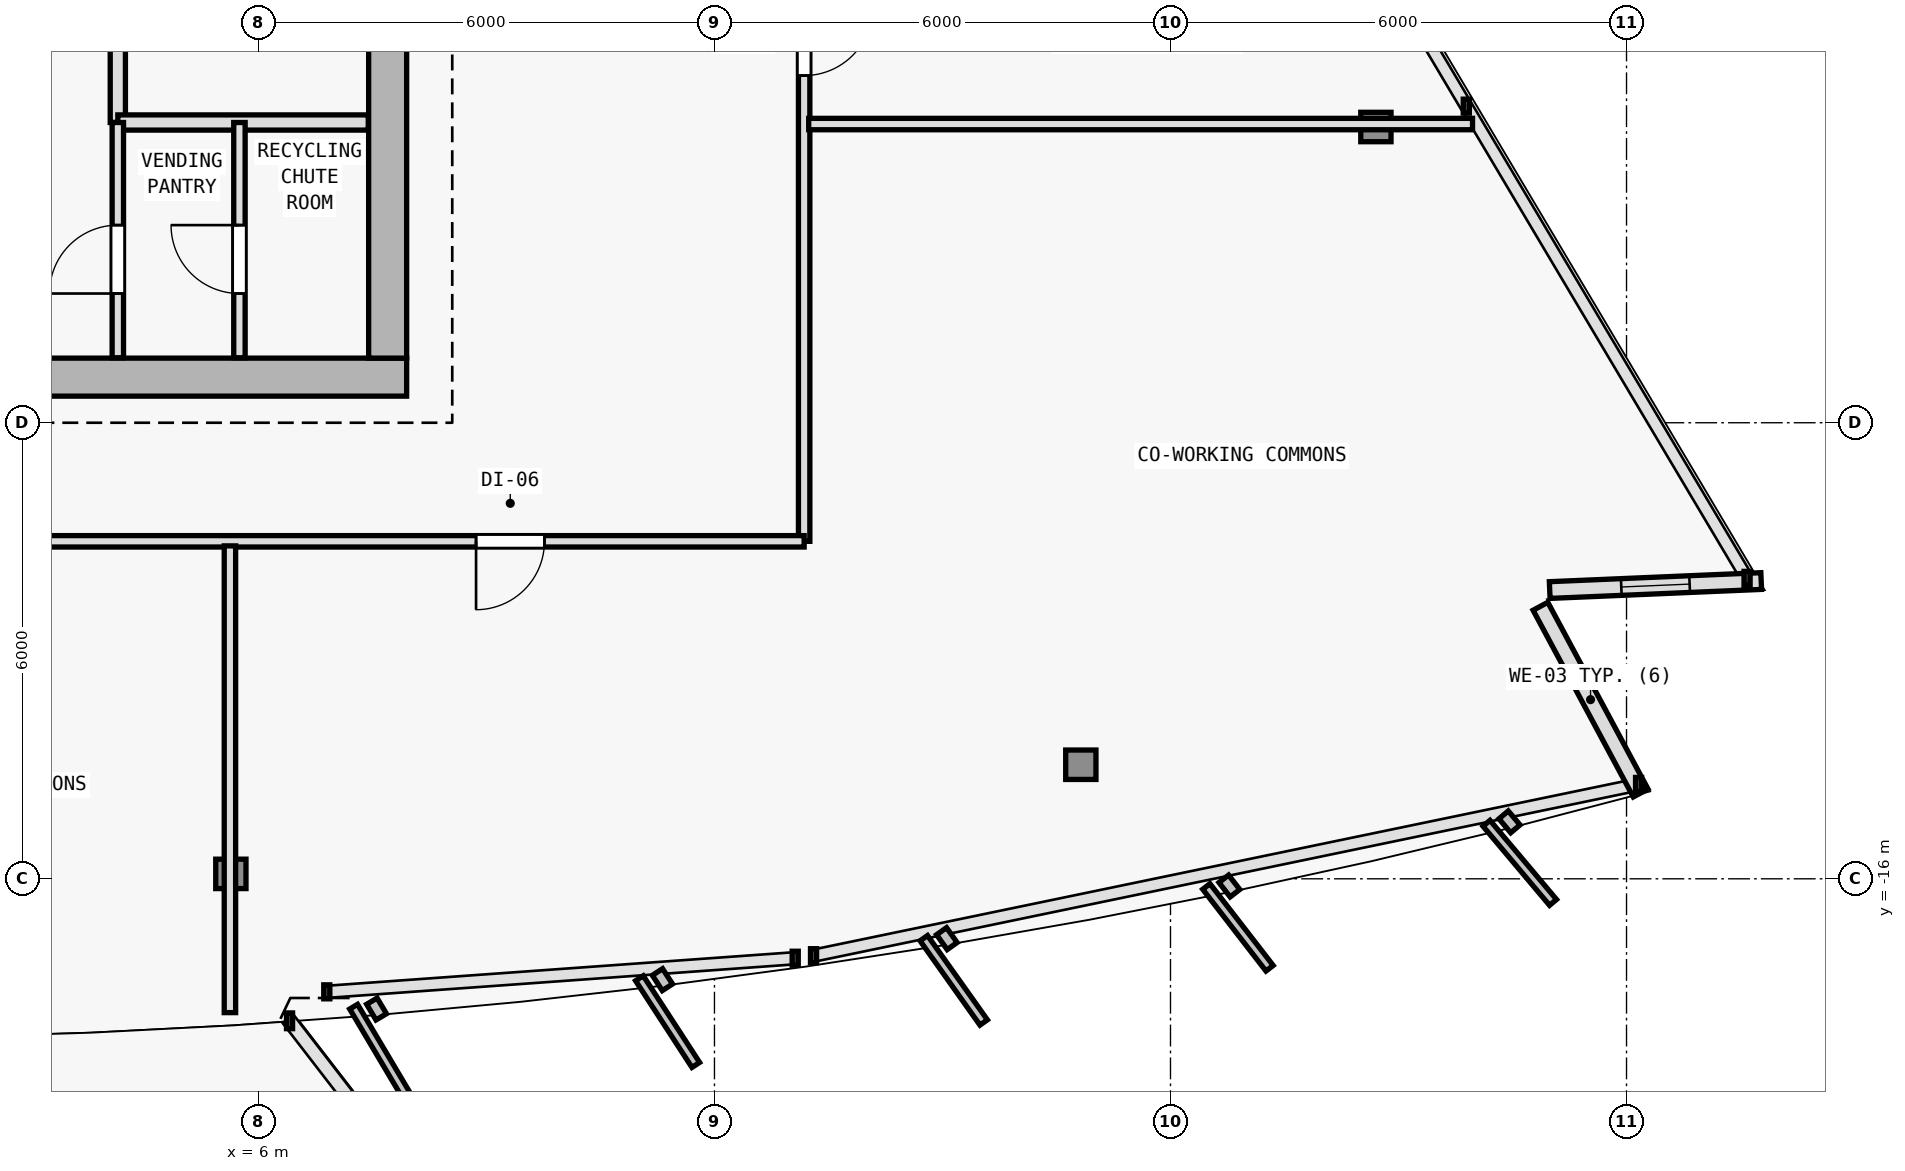
"""IFC4 building model, lengths in metres.
Left out: names, types, materials, properties, quantities, classifications, styles, units other than length and angle.
Written with IfcOpenShell. Run it as: python <this file> out.ifc"""

import sys

from ifc_helpers import new_model, si_unit, direction, frame, frame_2d, origin, origin_2d, place, context, subcontext, project, spatial, rectangle, i_section, extrude, element, fill, save


model = new_model("IFC4")
c1 = context("Model", 3, precision=1e-05, world=origin(), true_north=direction((0.0, 1.0)))
c2 = subcontext(c1, "Body", "Model", "MODEL_VIEW")
j1 = project(units=[si_unit("LENGTHUNIT", "METRE"), si_unit("PLANEANGLEUNIT", "RADIAN")], contexts=[c1])
p1 = place(None, origin())
s1 = spatial("IfcSite", under=j1, at=p1, CompositionType="ELEMENT")
p2 = place(p1, origin())
s2 = spatial("IfcBuilding", under=s1, at=p2, CompositionType="ELEMENT")
p3 = place(p2, frame((0.0, 0.0, 205.5)))
s3 = spatial("IfcBuildingStorey", under=s2, at=p3, CompositionType="ELEMENT", Elevation=205.5)
p4 = place(p3, frame((7.7, -9.4, 0.0), z_axis=(0.0, 0.0, 1.0), x_axis=(1.0, 0.0, 0.0)))
e1 = element("IfcColumn", 1, at=p4, inside=s3, PredefinedType="COLUMN", context=c2, shape_type="SweptSolid", body=[
    extrude(i_section(OverallWidth=0.398, OverallDepth=0.387, WebThickness=0.013, FlangeThickness=0.022, FilletRadius=0.015, at=origin_2d()), origin(), (0.0, 0.0, 1.0), 3.6),
])
p5 = place(p3, frame((5.637, -15.935, 0.006), z_axis=(-0.006866308162, 0.0352833063, 0.999353762243), x_axis=(-0.981585848295, -0.191021523464, 0.0)))
e2 = element("IfcColumn", 2, at=p5, inside=s3, PredefinedType="COLUMN", context=c2, shape_type="SweptSolid", body=[
    extrude(i_section(OverallWidth=0.398, OverallDepth=0.387, WebThickness=0.013, FlangeThickness=0.022, FilletRadius=0.015, at=origin_2d()), origin(), (0.0, 0.0, 1.0), 3.591),
])
p6 = place(p3, frame((16.82, -14.5, 0.006), z_axis=(-0.020664238418, 0.033511412961, 0.999224686671), x_axis=(-0.851183725565, -0.524867855115, 0.0)))
e3 = element("IfcColumn", 3, at=p6, inside=s3, PredefinedType="COLUMN", context=c2, shape_type="SweptSolid", body=[
    extrude(i_section(OverallWidth=0.398, OverallDepth=0.387, WebThickness=0.013, FlangeThickness=0.022, FilletRadius=0.015, at=origin_2d()), origin(), (0.0, 0.0, 1.0), 3.592),
])
p7 = place(p3, frame((20.702, -6.109, 0.006), z_axis=(-0.026039494941, 0.021620259507, 0.999427090428), x_axis=(-0.638800249892, -0.769372628015, 0.0)))
e4 = element("IfcColumn", 4, at=p7, inside=s3, PredefinedType="COLUMN", context=c2, shape_type="SweptSolid", body=[
    extrude(i_section(OverallWidth=0.398, OverallDepth=0.387, WebThickness=0.013, FlangeThickness=0.022, FilletRadius=0.015, at=origin_2d()), origin(), (0.0, 0.0, 1.0), 3.591),
])
p8 = place(p3, frame((22.868, -12.415, 0.0), z_axis=(0.0, 0.0, 1.0), x_axis=(0.472845900162, -0.881145138272, 0.0)))
e5 = element("IfcWall", 5, at=p8, inside=s3, PredefinedType="SOLIDWALL", context=c2, shape_type="SweptSolid", body=[
    extrude(rectangle(XDim=2.788, YDim=0.22, at=frame_2d((1.394, 0.0))), origin(), (0.0, 0.0, 1.0), 3.35),
])
p9 = place(p3, frame((25.772, -12.083, 0.0), z_axis=(0.0, 0.0, 1.0), x_axis=(-0.999095761456, -0.042516578425, 0.0)))
e6 = element("IfcWall", 6, at=p9, inside=s3, PredefinedType="SOLIDWALL", context=c2, shape_type="SweptSolid", body=[
    extrude(rectangle(XDim=2.785, YDim=0.22, at=frame_2d((1.393, 0.0))), origin(), (0.0, 0.0, 1.0), 3.35),
])
p10 = place(p9, frame((0.942, 0.0, 0.62)))
e7 = element("IfcOpeningElement", 7, at=p10, cuts=e6, PredefinedType="OPENING", context=c2, shape_type="SweptSolid", body=[
    extrude(rectangle(XDim=0.9, YDim=1.6, at=frame_2d((0.45, 0.8))), frame((0.0, 0.12, 0.0), z_axis=(0.0, -1.0, 0.0), x_axis=(1.0, 0.0, 0.0)), (0.0, 0.0, 1.0), 0.24),
])
p11 = place(p3, frame((-7.95, -9.4, 0.0), z_axis=(0.0, 0.0, 1.0), x_axis=(1.0, 0.0, 0.0)))
e8 = element("IfcWall", 8, at=p11, inside=s3, PredefinedType="SHEAR", context=c2, shape_type="SweptSolid", body=[
    extrude(rectangle(XDim=15.9, YDim=0.5, at=frame_2d((7.95, 0.0))), origin(), (0.0, 0.0, 1.0), 3.35),
])
p12 = place(p11, frame((9.6, 0.0, 0.0)))
e9 = element("IfcOpeningElement", 9, at=p12, cuts=e8, PredefinedType="OPENING", context=c2, shape_type="SweptSolid", body=[
    extrude(rectangle(XDim=1.5, YDim=2.2, at=frame_2d((0.75, 1.1))), frame((0.0, 0.26, 0.0), z_axis=(0.0, -1.0, 0.0), x_axis=(1.0, 0.0, 0.0)), (0.0, 0.0, 1.0), 0.52),
])
p13 = place(p3, frame((7.7, 9.95, 0.0), z_axis=(0.0, 0.0, 1.0), x_axis=(0.0, -1.0, 0.0)))
e10 = element("IfcWall", 10, at=p13, inside=s3, PredefinedType="SHEAR", context=c2, shape_type="SweptSolid", body=[
    extrude(rectangle(XDim=19.1, YDim=0.5, at=frame_2d((9.55, 0.0))), origin(), (0.0, 0.0, 1.0), 3.35),
])
p14 = place(p3, frame((4.15, -6.05, 0.0), z_axis=(0.0, 0.0, 1.0), x_axis=(0.0, 1.0, 0.0)))
e11 = element("IfcWall", 11, at=p14, inside=s3, PredefinedType="SOLIDWALL", context=c2, shape_type="SweptSolid", body=[
    extrude(rectangle(XDim=8.7, YDim=0.2, at=frame_2d((4.35, 0.0))), origin(), (0.0, 0.0, 1.0), 3.35),
])
p15 = place(p14, frame((3.6, 0.0, 0.0)))
e12 = element("IfcOpeningElement", 12, at=p15, cuts=e11, PredefinedType="OPENING", context=c2, shape_type="SweptSolid", body=[
    extrude(rectangle(XDim=0.95, YDim=2.1, at=frame_2d((0.475, 1.05))), frame((0.0, 0.11, 0.0), z_axis=(0.0, -1.0, 0.0), x_axis=(1.0, 0.0, 0.0)), (0.0, 0.0, 1.0), 0.22),
])
p16 = place(p3, frame((4.15, -6.05, 0.0), z_axis=(0.0, 0.0, 1.0), x_axis=(1.0, 0.0, 0.0)))
e13 = element("IfcWall", 13, at=p16, inside=s3, PredefinedType="SOLIDWALL", context=c2, shape_type="SweptSolid", body=[
    extrude(rectangle(XDim=3.295, YDim=0.2, at=frame_2d((1.647, 0.0))), origin(), (0.0, 0.0, 1.0), 3.35),
])
p17 = place(p3, frame((4.15, -9.145, 0.0), z_axis=(0.0, 0.0, 1.0), x_axis=(0.0, 1.0, 0.0)))
e14 = element("IfcWall", 14, at=p17, inside=s3, PredefinedType="PARTITIONING", context=c2, shape_type="SweptSolid", body=[
    extrude(rectangle(XDim=3.095, YDim=0.15, at=frame_2d((1.547, 0.0))), origin(), (0.0, 0.0, 1.0), 3.35),
])
p18 = place(p17, frame((0.845, 0.0, 0.0)))
e15 = element("IfcOpeningElement", 15, at=p18, cuts=e14, PredefinedType="OPENING", context=c2, shape_type="SweptSolid", body=[
    extrude(rectangle(XDim=0.9, YDim=2.1, at=frame_2d((0.45, 1.05))), frame((0.0, 0.085, 0.0), z_axis=(0.0, -1.0, 0.0), x_axis=(1.0, 0.0, 0.0)), (0.0, 0.0, 1.0), 0.17),
])
p19 = place(p3, frame((5.75, -9.145, 0.0), z_axis=(0.0, 0.0, 1.0), x_axis=(0.0, 1.0, 0.0)))
e16 = element("IfcWall", 16, at=p19, inside=s3, PredefinedType="PARTITIONING", context=c2, shape_type="SweptSolid", body=[
    extrude(rectangle(XDim=3.095, YDim=0.15, at=frame_2d((1.547, 0.0))), origin(), (0.0, 0.0, 1.0), 3.35),
])
p20 = place(p19, frame((0.845, 0.0, 0.0)))
e17 = element("IfcOpeningElement", 17, at=p20, cuts=e16, PredefinedType="OPENING", context=c2, shape_type="SweptSolid", body=[
    extrude(rectangle(XDim=0.9, YDim=2.1, at=frame_2d((0.45, 1.05))), frame((0.0, 0.085, 0.0), z_axis=(0.0, -1.0, 0.0), x_axis=(1.0, 0.0, 0.0)), (0.0, 0.0, 1.0), 0.17),
])
p21 = place(p3, frame((13.18, 8.444, 0.0), z_axis=(0.0, 0.0, 1.0), x_axis=(0.0, -1.0, 0.0)))
e18 = element("IfcWall", 18, at=p21, inside=s3, PredefinedType="PARTITIONING", context=c2, shape_type="SweptSolid", body=[
    extrude(rectangle(XDim=20.004, YDim=0.15, at=frame_2d((10.002, 0.0))), origin(), (0.0, 0.0, 1.0), 2.825),
])
p22 = place(p21, frame((12.977, 0.0, 0.0)))
e19 = element("IfcOpeningElement", 19, at=p22, cuts=e18, PredefinedType="OPENING", context=c2, shape_type="SweptSolid", body=[
    extrude(rectangle(XDim=0.9, YDim=2.1, at=frame_2d((0.45, 1.05))), frame((0.0, 0.085, 0.0), z_axis=(0.0, -1.0, 0.0), x_axis=(1.0, 0.0, 0.0)), (0.0, 0.0, 1.0), 0.17),
])
p23 = place(p21, frame((10.448, 0.0, 0.0)))
e20 = element("IfcOpeningElement", 20, at=p23, cuts=e18, PredefinedType="OPENING", context=c2, shape_type="SweptSolid", body=[
    extrude(rectangle(XDim=0.9, YDim=2.1, at=frame_2d((0.45, 1.05))), frame((0.0, 0.085, 0.0), z_axis=(0.0, -1.0, 0.0), x_axis=(1.0, 0.0, 0.0)), (0.0, 0.0, 1.0), 0.17),
])
p24 = place(p21, frame((7.743, 0.0, 0.0)))
e21 = element("IfcOpeningElement", 21, at=p24, cuts=e18, PredefinedType="OPENING", context=c2, shape_type="SweptSolid", body=[
    extrude(rectangle(XDim=0.9, YDim=2.1, at=frame_2d((0.45, 1.05))), frame((0.0, 0.085, 0.0), z_axis=(0.0, -1.0, 0.0), x_axis=(1.0, 0.0, 0.0)), (0.0, 0.0, 1.0), 0.17),
])
p25 = place(p21, frame((5.302, 0.0, 0.0)))
e22 = element("IfcOpeningElement", 22, at=p25, cuts=e18, PredefinedType="OPENING", context=c2, shape_type="SweptSolid", body=[
    extrude(rectangle(XDim=0.9, YDim=2.1, at=frame_2d((0.45, 1.05))), frame((0.0, 0.085, 0.0), z_axis=(0.0, -1.0, 0.0), x_axis=(1.0, 0.0, 0.0)), (0.0, 0.0, 1.0), 0.17),
])
p26 = place(p3, frame((13.18, -11.56, 0.0), z_axis=(0.0, 0.0, 1.0), x_axis=(-1.0, 0.0, 0.0)))
e23 = element("IfcWall", 23, at=p26, inside=s3, PredefinedType="PARTITIONING", context=c2, shape_type="SweptSolid", body=[
    extrude(rectangle(XDim=23.04, YDim=0.15, at=frame_2d((11.52, 0.0))), origin(), (0.0, 0.0, 1.0), 2.825),
])
p27 = place(p26, frame((20.383, 0.0, 0.0)))
e24 = element("IfcOpeningElement", 24, at=p27, cuts=e23, PredefinedType="OPENING", context=c2, shape_type="SweptSolid", body=[
    extrude(rectangle(XDim=0.9, YDim=2.1, at=frame_2d((0.45, 1.05))), frame((0.0, 0.085, 0.0), z_axis=(0.0, -1.0, 0.0), x_axis=(1.0, 0.0, 0.0)), (0.0, 0.0, 1.0), 0.17),
])
p28 = place(p26, frame((12.73, 0.0, 0.0)))
e25 = element("IfcOpeningElement", 25, at=p28, cuts=e23, PredefinedType="OPENING", context=c2, shape_type="SweptSolid", body=[
    extrude(rectangle(XDim=0.9, YDim=2.1, at=frame_2d((0.45, 1.05))), frame((0.0, 0.085, 0.0), z_axis=(0.0, -1.0, 0.0), x_axis=(1.0, 0.0, 0.0)), (0.0, 0.0, 1.0), 0.17),
])
p29 = place(p26, frame((3.417, 0.0, 0.0)))
e26 = element("IfcOpeningElement", 26, at=p29, cuts=e23, PredefinedType="OPENING", context=c2, shape_type="SweptSolid", body=[
    extrude(rectangle(XDim=0.9, YDim=2.1, at=frame_2d((0.45, 1.05))), frame((0.0, 0.085, 0.0), z_axis=(0.0, -1.0, 0.0), x_axis=(1.0, 0.0, 0.0)), (0.0, 0.0, 1.0), 0.17),
])
p30 = place(p3, frame((5.625, -11.62, 0.0), z_axis=(0.0, 0.0, 1.0), x_axis=(0.0, -1.0, 0.0)))
e27 = element("IfcWall", 27, at=p30, inside=s3, PredefinedType="PARTITIONING", context=c2, shape_type="SweptSolid", body=[
    extrude(rectangle(XDim=6.14, YDim=0.15, at=frame_2d((3.07, 0.0))), origin(), (0.0, 0.0, 1.0), 2.775),
])
p31 = place(p3, frame((13.24, -6.07, 0.0), z_axis=(0.0, 0.0, 1.0), x_axis=(1.0, 0.0, 0.0)))
e28 = element("IfcWall", 28, at=p31, inside=s3, PredefinedType="PARTITIONING", context=c2, shape_type="SweptSolid", body=[
    extrude(rectangle(XDim=8.734, YDim=0.15, at=frame_2d((4.367, 0.0))), origin(), (0.0, 0.0, 1.0), 2.825),
])
p32 = place(p10, origin())
e29 = element("IfcWindow", 29, at=p32, inside=s3, PartitioningType="SINGLE_PANEL", PredefinedType="WINDOW", context=c2, shape_type="SweptSolid", body=[
    extrude(rectangle(XDim=0.9, YDim=1.6, at=frame_2d((0.45, 0.8))), frame((0.0, 0.03, 0.0), z_axis=(0.0, -1.0, 0.0), x_axis=(1.0, 0.0, 0.0)), (0.0, 0.0, 1.0), 0.06),
])
fill(e7, e29)
p33 = place(p18, origin())
e30 = element("IfcDoor", 30, at=p33, inside=s3, OperationType="SINGLE_SWING_LEFT", PredefinedType="DOOR", context=c2, shape_type="SweptSolid", body=[
    extrude(rectangle(XDim=0.9, YDim=2.1, at=frame_2d((0.45, 1.05))), frame((0.0, 0.025, 0.0), z_axis=(0.0, -1.0, 0.0), x_axis=(1.0, 0.0, 0.0)), (0.0, 0.0, 1.0), 0.05),
])
fill(e15, e30)
p34 = place(p20, origin())
e31 = element("IfcDoor", 31, at=p34, inside=s3, OperationType="SINGLE_SWING_RIGHT", PredefinedType="DOOR", context=c2, shape_type="SweptSolid", body=[
    extrude(rectangle(XDim=0.9, YDim=2.1, at=frame_2d((0.45, 1.05))), frame((0.0, 0.025, 0.0), z_axis=(0.0, -1.0, 0.0), x_axis=(1.0, 0.0, 0.0)), (0.0, 0.0, 1.0), 0.05),
])
fill(e17, e31)
p35 = place(p29, origin())
e32 = element("IfcDoor", 32, at=p35, inside=s3, OperationType="SINGLE_SWING_RIGHT", PredefinedType="DOOR", context=c2, shape_type="SweptSolid", body=[
    extrude(rectangle(XDim=0.9, YDim=2.1, at=frame_2d((0.45, 1.05))), frame((0.0, 0.025, 0.0), z_axis=(0.0, -1.0, 0.0), x_axis=(1.0, 0.0, 0.0)), (0.0, 0.0, 1.0), 0.05),
])
fill(e26, e32)
p36 = place(p22, origin())
e33 = element("IfcDoor", 33, at=p36, inside=s3, OperationType="SINGLE_SWING_LEFT", PredefinedType="DOOR", context=c2, shape_type="SweptSolid", body=[
    extrude(rectangle(XDim=0.9, YDim=2.1, at=frame_2d((0.45, 1.05))), frame((0.0, 0.025, 0.0), z_axis=(0.0, -1.0, 0.0), x_axis=(1.0, 0.0, 0.0)), (0.0, 0.0, 1.0), 0.05),
])
fill(e19, e33)
save(model, sys.argv[1])
